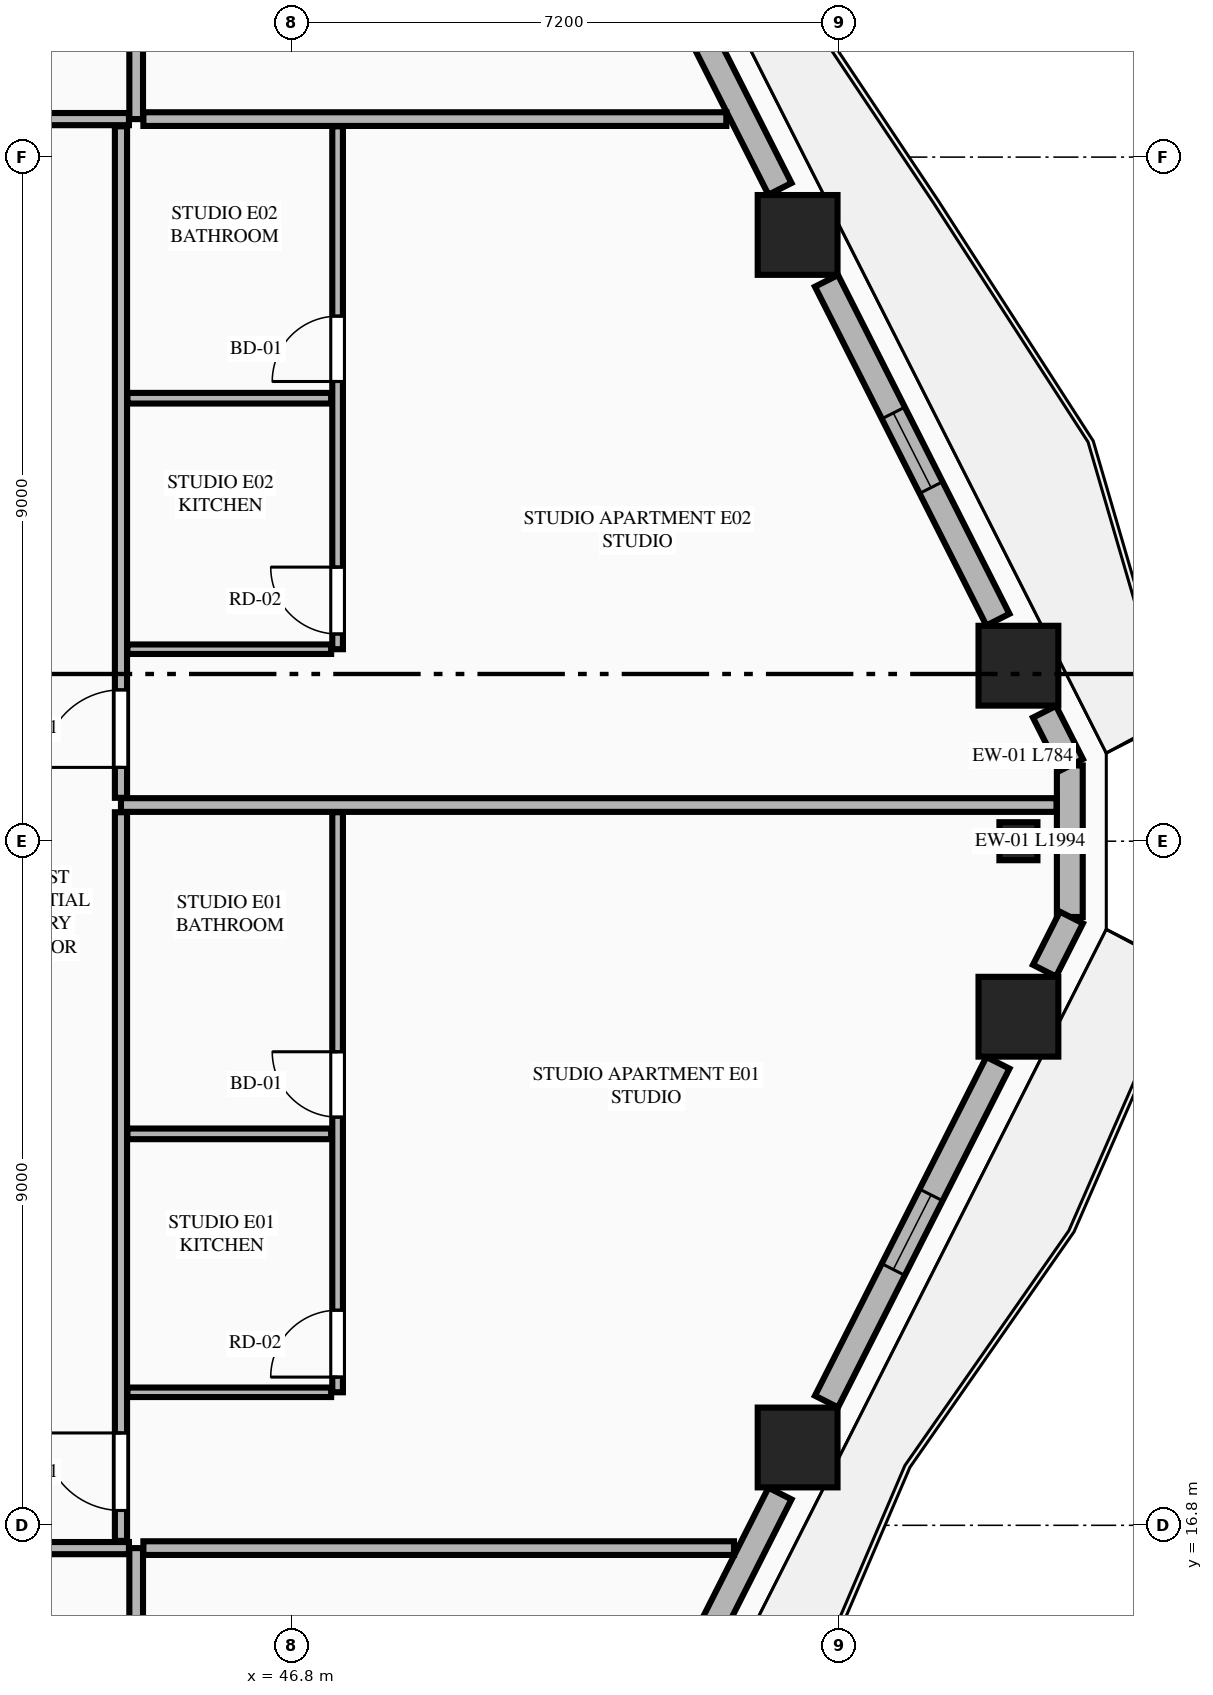
"""IFC4 building model, lengths in metres.
Left out: names, types, materials, properties, quantities, classifications, styles, units other than length and angle.
Written with IfcOpenShell. Run it as: python <this file> out.ifc"""

import sys

from ifc_helpers import new_model, si_unit, direction, frame, frame_2d, origin, origin_2d, place, context, subcontext, project, spatial, rectangle, extrude, element, fill, save


model = new_model("IFC4")
c1 = context("Model", 3, precision=1e-05, world=origin(), true_north=direction((0.0, 1.0)))
c2 = subcontext(c1, "Body", "Model", "MODEL_VIEW")
j1 = project(units=[si_unit("LENGTHUNIT", "METRE"), si_unit("PLANEANGLEUNIT", "RADIAN")], contexts=[c1])
p1 = place(None, origin())
s1 = spatial("IfcSite", under=j1, at=p1, CompositionType="ELEMENT")
p2 = place(p1, origin())
s2 = spatial("IfcBuilding", under=s1, at=p2, CompositionType="ELEMENT")
p3 = place(p2, frame((0.0, 0.0, 123.25)))
s3 = spatial("IfcBuildingStorey", under=s2, at=p3, CompositionType="ELEMENT", Elevation=123.25)
for number, where, z_axis, x_axis in (
    (1, (53.452, 17.824, 0.0), (0.0, 0.0, 1.0), (1.0, 0.0, 0.0)),
    (2, (56.357, 23.491, 0.0), (0.0, 0.0, 1.0), (1.0, 0.0, 0.0)),
    (3, (56.357, 28.109, 0.0), (0.0, 0.0, 1.0), (1.0, 0.0, 0.0)),
    (4, (53.452, 33.776, 0.0), (0.0, 0.0, 1.0), (1.0, 0.0, 0.0)),
):
    element("IfcColumn", number, at=place(p3, frame(where, z_axis=z_axis, x_axis=x_axis)), inside=s3, PredefinedType="COLUMN", context=c2, shape_type="SweptSolid", body=[
        extrude(rectangle(XDim=1.05, YDim=1.05, at=origin_2d()), origin(), (0.0, 0.0, 1.0), 3.55),
    ])
p4 = place(p3, frame((56.357, 25.8, 0.0), z_axis=(0.0, 0.0, 1.0), x_axis=(0.0, 1.0, 0.0)))
e5 = element("IfcColumn", 5, at=p4, inside=s3, PredefinedType="PILASTER", context=c2, shape_type="SweptSolid", body=[
    extrude(rectangle(XDim=0.5, YDim=0.35, at=origin_2d()), origin(), (0.0, 0.0, 1.0), 3.55),
])
p5 = place(p3, frame((57.033, 24.803, 0.0), z_axis=(0.0, 0.0, 1.0), x_axis=(0.0, 1.0, 0.0)))
e6 = element("IfcWall", 6, at=p5, inside=s3, PredefinedType="STANDARD", context=c2, shape_type="SweptSolid", body=[
    extrude(rectangle(XDim=1.994, YDim=0.34, at=frame_2d((0.997, 0.0))), origin(), (0.0, 0.0, 1.0), 3.34),
])
p6 = place(p3, frame((50.863, 12.561, 0.0), z_axis=(0.0, 0.0, 1.0), x_axis=(0.451567731634, 0.892236842855, 0.0)))
e7 = element("IfcWall", 7, at=p6, inside=s3, PredefinedType="STANDARD", context=c2, shape_type="SweptSolid", body=[
    extrude(rectangle(XDim=5.219, YDim=0.34, at=frame_2d((2.61, 0.0))), origin(), (0.0, 0.0, 1.0), 2.797),
])
p7 = place(p6, frame((1.532, 0.0, 0.0)))
e8 = element("IfcOpeningElement", 8, at=p7, cuts=e7, PredefinedType="OPENING", context=c2, shape_type="SweptSolid", body=[
    extrude(rectangle(XDim=1.1, YDim=2.25, at=frame_2d((0.55, 1.125))), frame((0.0, 0.18, 0.0), z_axis=(0.0, -1.0, 0.0), x_axis=(1.0, 0.0, 0.0)), (0.0, 0.0, 1.0), 0.36),
])
p8 = place(p3, frame((53.832, 18.428, 0.0), z_axis=(0.0, 0.0, 1.0), x_axis=(0.451431617681, 0.892305718102, 0.0)))
e9 = element("IfcWall", 9, at=p8, inside=s3, PredefinedType="STANDARD", context=c2, shape_type="SweptSolid", body=[
    extrude(rectangle(XDim=4.995, YDim=0.34, at=frame_2d((2.498, 0.0))), origin(), (0.0, 0.0, 1.0), 2.797),
])
p9 = place(p8, frame((1.947, 0.0, 0.75)))
e10 = element("IfcOpeningElement", 10, at=p9, cuts=e9, PredefinedType="OPENING", context=c2, shape_type="SweptSolid", body=[
    extrude(rectangle(XDim=1.1, YDim=1.897, at=frame_2d((0.55, 0.948))), frame((0.0, 0.18, 0.0), z_axis=(0.0, -1.0, 0.0), x_axis=(1.0, 0.0, 0.0)), (0.0, 0.0, 1.0), 0.36),
])
for number, where, z_axis, x_axis in (
    (11, (56.7, 24.097, 0.0), (0.0, 0.0, 1.0), (0.452, 0.892, 0.0)),
    (12, (57.054, 26.804, 0.0), (0.0, 0.0, 1.0), (-0.452, 0.892, 0.0)),
):
    element("IfcWall", number, at=place(p3, frame(where, z_axis=z_axis, x_axis=x_axis)), inside=s3, PredefinedType="STANDARD", context=c2, shape_type="SweptSolid", body=[
        extrude(rectangle(XDim=0.783, YDim=0.34, at=frame_2d((0.392, 0.0))), origin(), (0.0, 0.0, 1.0), 3.34),
    ])
p10 = place(p3, frame((56.087, 28.715, 0.0), z_axis=(0.0, 0.0, 1.0), x_axis=(-0.451431617681, 0.892305718102, 0.0)))
e13 = element("IfcWall", 13, at=p10, inside=s3, PredefinedType="STANDARD", context=c2, shape_type="SweptSolid", body=[
    extrude(rectangle(XDim=4.995, YDim=0.34, at=frame_2d((2.498, 0.0))), origin(), (0.0, 0.0, 1.0), 2.797),
])
p11 = place(p10, frame((1.947, 0.0, 0.75)))
e14 = element("IfcOpeningElement", 14, at=p11, cuts=e13, PredefinedType="OPENING", context=c2, shape_type="SweptSolid", body=[
    extrude(rectangle(XDim=1.1, YDim=1.897, at=frame_2d((0.55, 0.948))), frame((0.0, 0.18, 0.0), z_axis=(0.0, -1.0, 0.0), x_axis=(1.0, 0.0, 0.0)), (0.0, 0.0, 1.0), 0.36),
])
p12 = place(p3, frame((53.22, 34.382, 0.0), z_axis=(0.0, 0.0, 1.0), x_axis=(-0.451567731634, 0.892236842855, 0.0)))
e15 = element("IfcWall", 15, at=p12, inside=s3, PredefinedType="STANDARD", context=c2, shape_type="SweptSolid", body=[
    extrude(rectangle(XDim=5.219, YDim=0.34, at=frame_2d((2.61, 0.0))), origin(), (0.0, 0.0, 1.0), 2.797),
])
p13 = place(p12, frame((2.699, 0.0, 0.0)))
e16 = element("IfcOpeningElement", 16, at=p13, cuts=e15, PredefinedType="OPENING", context=c2, shape_type="SweptSolid", body=[
    extrude(rectangle(XDim=1.1, YDim=2.25, at=frame_2d((0.55, 1.125))), frame((0.0, 0.18, 0.0), z_axis=(0.0, -1.0, 0.0), x_axis=(1.0, 0.0, 0.0)), (0.0, 0.0, 1.0), 0.36),
])
p14 = place(p3, frame((44.75, 4.105, 0.0), z_axis=(0.0, 0.0, 1.0), x_axis=(0.0, 1.0, 0.0)))
e17 = element("IfcWall", 17, at=p14, inside=s3, PredefinedType="PARTITIONING", context=c2, shape_type="SweptSolid", body=[
    extrude(rectangle(XDim=12.395, YDim=0.18, at=frame_2d((6.198, 0.0))), origin(), (0.0, 0.0, 1.0), 3.34),
])
p15 = place(p3, frame((20.145, 16.5, 0.0), z_axis=(0.0, 0.0, 1.0), x_axis=(1.0, 0.0, 0.0)))
e18 = element("IfcWall", 18, at=p15, inside=s3, PredefinedType="PARTITIONING", context=c2, shape_type="SweptSolid", body=[
    extrude(rectangle(XDim=24.51, YDim=0.16, at=frame_2d((12.255, 0.0))), origin(), (0.0, 0.0, 1.0), 3.34),
])
p16 = place(p15, frame((0.405, 0.0, 0.0)))
e19 = element("IfcOpeningElement", 19, at=p16, cuts=e18, PredefinedType="OPENING", context=c2, shape_type="SweptSolid", body=[
    extrude(rectangle(XDim=1.35, YDim=2.35, at=frame_2d((0.675, 1.175))), frame((0.0, 0.09, 0.0), z_axis=(0.0, -1.0, 0.0), x_axis=(1.0, 0.0, 0.0)), (0.0, 0.0, 1.0), 0.18),
])
p17 = place(p3, frame((44.75, 35.3, 0.0), z_axis=(0.0, 0.0, 1.0), x_axis=(0.0, 1.0, 0.0)))
e20 = element("IfcWall", 20, at=p17, inside=s3, PredefinedType="PARTITIONING", context=c2, shape_type="SweptSolid", body=[
    extrude(rectangle(XDim=12.195, YDim=0.18, at=frame_2d((6.098, 0.0))), origin(), (0.0, 0.0, 1.0), 3.34),
])
p18 = place(p3, frame((20.145, 35.3, 0.0), z_axis=(0.0, 0.0, 1.0), x_axis=(1.0, 0.0, 0.0)))
e21 = element("IfcWall", 21, at=p18, inside=s3, PredefinedType="PARTITIONING", context=c2, shape_type="SweptSolid", body=[
    extrude(rectangle(XDim=24.51, YDim=0.16, at=frame_2d((12.255, 0.0))), origin(), (0.0, 0.0, 1.0), 3.34),
])
p19 = place(p18, frame((0.405, 0.0, 0.0)))
e22 = element("IfcOpeningElement", 22, at=p19, cuts=e21, PredefinedType="OPENING", context=c2, shape_type="SweptSolid", body=[
    extrude(rectangle(XDim=1.02, YDim=2.25, at=frame_2d((0.51, 1.125))), frame((0.0, 0.09, 0.0), z_axis=(0.0, -1.0, 0.0), x_axis=(1.0, 0.0, 0.0)), (0.0, 0.0, 1.0), 0.18),
])
p20 = place(p3, frame((44.845, 16.5, 0.0), z_axis=(0.0, 0.0, 1.0), x_axis=(1.0, 0.0, 0.0)))
e23 = element("IfcWall", 23, at=p20, inside=s3, PredefinedType="PARTITIONING", context=c2, shape_type="SweptSolid", body=[
    extrude(rectangle(XDim=7.77, YDim=0.18, at=frame_2d((3.885, 0.0))), origin(), (0.0, 0.0, 1.0), 3.34),
])
p21 = place(p3, frame((44.845, 35.3, 0.0), z_axis=(0.0, 0.0, 1.0), x_axis=(1.0, 0.0, 0.0)))
e24 = element("IfcWall", 24, at=p21, inside=s3, PredefinedType="PARTITIONING", context=c2, shape_type="SweptSolid", body=[
    extrude(rectangle(XDim=7.669, YDim=0.18, at=frame_2d((3.834, 0.0))), origin(), (0.0, 0.0, 1.0), 3.34),
])
p22 = place(p3, frame((44.55, 16.595, 0.0), z_axis=(0.0, 0.0, 1.0), x_axis=(0.0, 1.0, 0.0)))
e25 = element("IfcWall", 25, at=p22, inside=s3, PredefinedType="PARTITIONING", context=c2, shape_type="SweptSolid", body=[
    extrude(rectangle(XDim=9.586, YDim=0.16, at=frame_2d((4.793, 0.0))), origin(), (0.0, 0.0, 1.0), 3.34),
])
p23 = place(p22, frame((0.4, 0.0, 0.0)))
e26 = element("IfcOpeningElement", 26, at=p23, cuts=e25, PredefinedType="OPENING", context=c2, shape_type="SweptSolid", body=[
    extrude(rectangle(XDim=1.02, YDim=2.25, at=frame_2d((0.51, 1.125))), frame((0.0, 0.09, 0.0), z_axis=(0.0, -1.0, 0.0), x_axis=(1.0, 0.0, 0.0)), (0.0, 0.0, 1.0), 0.18),
])
p24 = place(p3, frame((44.635, 18.55, 0.0), z_axis=(0.0, 0.0, 1.0), x_axis=(1.0, 0.0, 0.0)))
e27 = element("IfcWall", 27, at=p24, inside=s3, PredefinedType="PARTITIONING", context=c2, shape_type="SweptSolid", body=[
    extrude(rectangle(XDim=2.68, YDim=0.125, at=frame_2d((1.34, 0.0))), origin(), (0.0, 0.0, 1.0), 2.722),
])
p25 = place(p3, frame((47.4, 18.55, 0.0), z_axis=(0.0, 0.0, 1.0), x_axis=(0.0, 1.0, 0.0)))
e28 = element("IfcWall", 28, at=p25, inside=s3, PredefinedType="PLUMBINGWALL", context=c2, shape_type="SweptSolid", body=[
    extrude(rectangle(XDim=7.631, YDim=0.14, at=frame_2d((3.815, 0.0))), origin(), (0.0, 0.0, 1.0), 3.34),
])
p26 = place(p25, frame((3.62, 0.0, 0.0)))
e29 = element("IfcOpeningElement", 29, at=p26, cuts=e28, PredefinedType="OPENING", context=c2, shape_type="SweptSolid", body=[
    extrude(rectangle(XDim=0.86, YDim=2.1, at=frame_2d((0.43, 1.05))), frame((0.0, 0.08, 0.0), z_axis=(0.0, -1.0, 0.0), x_axis=(1.0, 0.0, 0.0)), (0.0, 0.0, 1.0), 0.16),
])
p27 = place(p25, frame((0.2, 0.0, 0.0)))
e30 = element("IfcOpeningElement", 30, at=p27, cuts=e28, PredefinedType="OPENING", context=c2, shape_type="SweptSolid", body=[
    extrude(rectangle(XDim=0.88, YDim=2.15, at=frame_2d((0.44, 1.075))), frame((0.0, 0.08, 0.0), z_axis=(0.0, -1.0, 0.0), x_axis=(1.0, 0.0, 0.0)), (0.0, 0.0, 1.0), 0.16),
])
p28 = place(p3, frame((44.635, 21.95, 0.0), z_axis=(0.0, 0.0, 1.0), x_axis=(1.0, 0.0, 0.0)))
e31 = element("IfcWall", 31, at=p28, inside=s3, PredefinedType="PLUMBINGWALL", context=c2, shape_type="SweptSolid", body=[
    extrude(rectangle(XDim=2.68, YDim=0.14, at=frame_2d((1.34, 0.0))), origin(), (0.0, 0.0, 1.0), 3.34),
])
p29 = place(p3, frame((44.55, 26.276, 0.0), z_axis=(0.0, 0.0, 1.0), x_axis=(1.0, 0.0, 0.0)))
e32 = element("IfcWall", 32, at=p29, inside=s3, PredefinedType="PARTITIONING", context=c2, shape_type="SweptSolid", body=[
    extrude(rectangle(XDim=12.308, YDim=0.18, at=frame_2d((6.154, 0.0))), origin(), (0.0, 0.0, 1.0), 3.34),
])
p30 = place(p3, frame((44.55, 26.371, 0.0), z_axis=(0.0, 0.0, 1.0), x_axis=(0.0, 1.0, 0.0)))
e33 = element("IfcWall", 33, at=p30, inside=s3, PredefinedType="PARTITIONING", context=c2, shape_type="SweptSolid", body=[
    extrude(rectangle(XDim=8.834, YDim=0.16, at=frame_2d((4.417, 0.0))), origin(), (0.0, 0.0, 1.0), 3.34),
])
p31 = place(p30, frame((0.4, 0.0, 0.0)))
e34 = element("IfcOpeningElement", 34, at=p31, cuts=e33, PredefinedType="OPENING", context=c2, shape_type="SweptSolid", body=[
    extrude(rectangle(XDim=1.02, YDim=2.25, at=frame_2d((0.51, 1.125))), frame((0.0, 0.09, 0.0), z_axis=(0.0, -1.0, 0.0), x_axis=(1.0, 0.0, 0.0)), (0.0, 0.0, 1.0), 0.18),
])
p32 = place(p3, frame((44.635, 28.326, 0.0), z_axis=(0.0, 0.0, 1.0), x_axis=(1.0, 0.0, 0.0)))
e35 = element("IfcWall", 35, at=p32, inside=s3, PredefinedType="PARTITIONING", context=c2, shape_type="SweptSolid", body=[
    extrude(rectangle(XDim=2.68, YDim=0.125, at=frame_2d((1.34, 0.0))), origin(), (0.0, 0.0, 1.0), 3.34),
])
p33 = place(p3, frame((47.4, 28.326, 0.0), z_axis=(0.0, 0.0, 1.0), x_axis=(0.0, 1.0, 0.0)))
e36 = element("IfcWall", 36, at=p33, inside=s3, PredefinedType="PLUMBINGWALL", context=c2, shape_type="SweptSolid", body=[
    extrude(rectangle(XDim=6.879, YDim=0.14, at=frame_2d((3.439, 0.0))), origin(), (0.0, 0.0, 1.0), 3.34),
])
p34 = place(p33, frame((3.522, 0.0, 0.0)))
e37 = element("IfcOpeningElement", 37, at=p34, cuts=e36, PredefinedType="OPENING", context=c2, shape_type="SweptSolid", body=[
    extrude(rectangle(XDim=0.86, YDim=2.1, at=frame_2d((0.43, 1.05))), frame((0.0, 0.08, 0.0), z_axis=(0.0, -1.0, 0.0), x_axis=(1.0, 0.0, 0.0)), (0.0, 0.0, 1.0), 0.16),
])
p35 = place(p33, frame((0.2, 0.0, 0.0)))
e38 = element("IfcOpeningElement", 38, at=p35, cuts=e36, PredefinedType="OPENING", context=c2, shape_type="SweptSolid", body=[
    extrude(rectangle(XDim=0.88, YDim=2.15, at=frame_2d((0.44, 1.075))), frame((0.0, 0.08, 0.0), z_axis=(0.0, -1.0, 0.0), x_axis=(1.0, 0.0, 0.0)), (0.0, 0.0, 1.0), 0.16),
])
p36 = place(p3, frame((44.635, 31.628, 0.0), z_axis=(0.0, 0.0, 1.0), x_axis=(1.0, 0.0, 0.0)))
e39 = element("IfcWall", 39, at=p36, inside=s3, PredefinedType="PLUMBINGWALL", context=c2, shape_type="SweptSolid", body=[
    extrude(rectangle(XDim=2.68, YDim=0.14, at=frame_2d((1.34, 0.0))), origin(), (0.0, 0.0, 1.0), 3.34),
])
p37 = place(p9, origin())
e40 = element("IfcWindow", 40, at=p37, inside=s3, PartitioningType="SINGLE_PANEL", PredefinedType="WINDOW", context=c2, shape_type="SweptSolid", body=[
    extrude(rectangle(XDim=1.1, YDim=1.897, at=frame_2d((0.55, 0.948))), frame((0.0, 0.03, 0.0), z_axis=(0.0, -1.0, 0.0), x_axis=(1.0, 0.0, 0.0)), (0.0, 0.0, 1.0), 0.06),
])
fill(e10, e40)
p38 = place(p11, origin())
e41 = element("IfcWindow", 41, at=p38, inside=s3, PartitioningType="SINGLE_PANEL", PredefinedType="WINDOW", context=c2, shape_type="SweptSolid", body=[
    extrude(rectangle(XDim=1.1, YDim=1.897, at=frame_2d((0.55, 0.948))), frame((0.0, 0.03, 0.0), z_axis=(0.0, -1.0, 0.0), x_axis=(1.0, 0.0, 0.0)), (0.0, 0.0, 1.0), 0.06),
])
fill(e14, e41)
p39 = place(p26, origin())
e42 = element("IfcDoor", 42, at=p39, inside=s3, OperationType="SINGLE_SWING_RIGHT", PredefinedType="DOOR", context=c2, shape_type="SweptSolid", body=[
    extrude(rectangle(XDim=0.86, YDim=2.1, at=frame_2d((0.43, 1.05))), frame((0.0, 0.025, 0.0), z_axis=(0.0, -1.0, 0.0), x_axis=(1.0, 0.0, 0.0)), (0.0, 0.0, 1.0), 0.05),
])
fill(e29, e42)
p40 = place(p23, origin())
e43 = element("IfcDoor", 43, at=p40, inside=s3, OperationType="SINGLE_SWING_RIGHT", PredefinedType="DOOR", context=c2, shape_type="SweptSolid", body=[
    extrude(rectangle(XDim=1.02, YDim=2.25, at=frame_2d((0.51, 1.125))), frame((0.0, 0.025, 0.0), z_axis=(0.0, -1.0, 0.0), x_axis=(1.0, 0.0, 0.0)), (0.0, 0.0, 1.0), 0.05),
])
fill(e26, e43)
p41 = place(p27, origin())
e44 = element("IfcDoor", 44, at=p41, inside=s3, OperationType="SINGLE_SWING_LEFT", PredefinedType="DOOR", context=c2, shape_type="SweptSolid", body=[
    extrude(rectangle(XDim=0.88, YDim=2.15, at=frame_2d((0.44, 1.075))), frame((0.0, 0.025, 0.0), z_axis=(0.0, -1.0, 0.0), x_axis=(1.0, 0.0, 0.0)), (0.0, 0.0, 1.0), 0.05),
])
fill(e30, e44)
p42 = place(p34, origin())
e45 = element("IfcDoor", 45, at=p42, inside=s3, OperationType="SINGLE_SWING_LEFT", PredefinedType="DOOR", context=c2, shape_type="SweptSolid", body=[
    extrude(rectangle(XDim=0.86, YDim=2.1, at=frame_2d((0.43, 1.05))), frame((0.0, 0.025, 0.0), z_axis=(0.0, -1.0, 0.0), x_axis=(1.0, 0.0, 0.0)), (0.0, 0.0, 1.0), 0.05),
])
fill(e37, e45)
p43 = place(p31, origin())
e46 = element("IfcDoor", 46, at=p43, inside=s3, OperationType="SINGLE_SWING_LEFT", PredefinedType="DOOR", context=c2, shape_type="SweptSolid", body=[
    extrude(rectangle(XDim=1.02, YDim=2.25, at=frame_2d((0.51, 1.125))), frame((0.0, 0.025, 0.0), z_axis=(0.0, -1.0, 0.0), x_axis=(1.0, 0.0, 0.0)), (0.0, 0.0, 1.0), 0.05),
])
fill(e34, e46)
p44 = place(p35, origin())
e47 = element("IfcDoor", 47, at=p44, inside=s3, OperationType="SINGLE_SWING_RIGHT", PredefinedType="DOOR", context=c2, shape_type="SweptSolid", body=[
    extrude(rectangle(XDim=0.88, YDim=2.15, at=frame_2d((0.44, 1.075))), frame((0.0, 0.025, 0.0), z_axis=(0.0, -1.0, 0.0), x_axis=(1.0, 0.0, 0.0)), (0.0, 0.0, 1.0), 0.05),
])
fill(e38, e47)
save(model, sys.argv[1])
